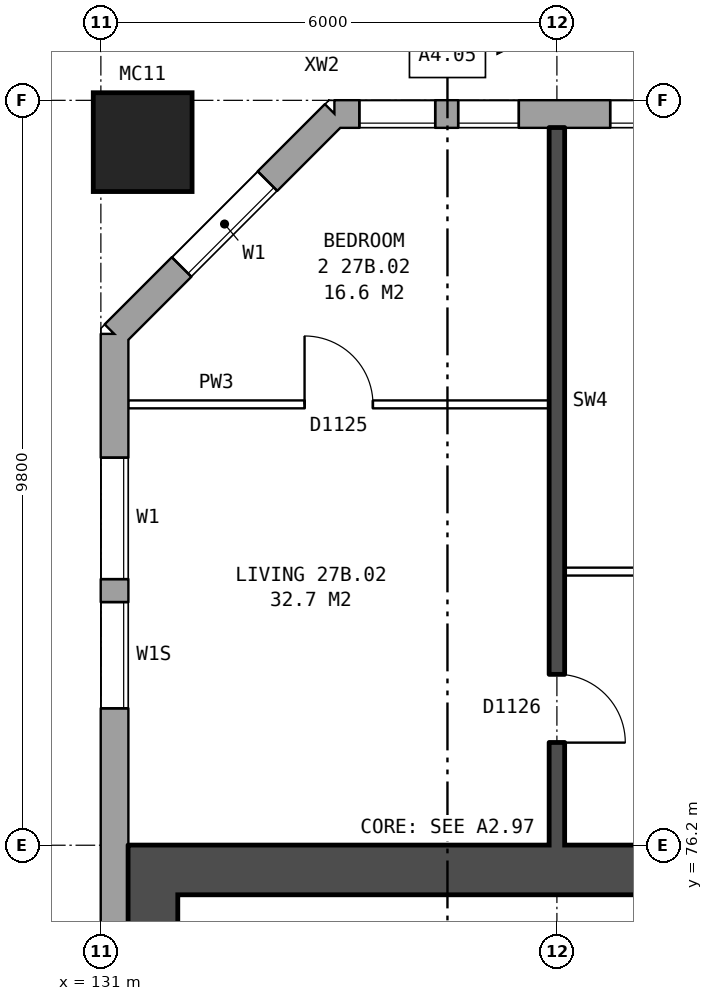
"""IFC4 building model, lengths in metres.
Left out: names, types, materials, properties, quantities, classifications, styles, units other than length and angle.
Written with IfcOpenShell. Run it as: python <this file> out.ifc"""

import sys

from ifc_helpers import new_model, si_unit, direction, frame, frame_2d, origin, origin_2d, place, context, subcontext, project, spatial, rectangle, hollow_rectangle, extrude, element, fill, save


model = new_model("IFC4")
c1 = context("Model", 3, precision=1e-05, world=origin(), true_north=direction((0.0, 1.0)))
c2 = subcontext(c1, "Body", "Model", "MODEL_VIEW")
j1 = project(units=[si_unit("LENGTHUNIT", "METRE"), si_unit("PLANEANGLEUNIT", "RADIAN")], contexts=[c1])
p1 = place(None, origin())
s1 = spatial("IfcSite", under=j1, at=p1, CompositionType="ELEMENT")
p2 = place(p1, origin())
s2 = spatial("IfcBuilding", under=s1, at=p2, CompositionType="ELEMENT")
p3 = place(p2, frame((0.0, 0.0, 99.5)))
s3 = spatial("IfcBuildingStorey", under=s2, at=p3, CompositionType="ELEMENT", Elevation=99.5)
p4 = place(p3, frame((131.55, 85.45, 0.0), z_axis=(0.0, 0.0, 1.0), x_axis=(1.0, 0.0, 0.0)))
e1 = element("IfcColumn", 1, at=p4, inside=s3, PredefinedType="COLUMN", context=c2, shape_type="SweptSolid", body=[
    extrude(hollow_rectangle(XDim=1.3, YDim=1.3, WallThickness=0.07, at=origin_2d()), origin(), (0.0, 0.0, 1.0), 3.1),
])
p5 = place(p3, frame((170.925, 85.82, 0.0), z_axis=(0.0, 0.0, 1.0), x_axis=(-1.0, 0.0, 0.0)))
e2 = element("IfcWall", 2, at=p5, inside=s3, PredefinedType="STANDARD", context=c2, shape_type="SweptSolid", body=[
    extrude(rectangle(XDim=36.851, YDim=0.36, at=frame_2d((18.425, 0.0))), origin(), (0.0, 0.0, 1.0), 2.85),
])
p6 = place(p5, frame((0.3, 0.0, 0.8)))
e3 = element("IfcOpeningElement", 3, at=p6, cuts=e2, PredefinedType="OPENING", context=c2, shape_type="SweptSolid", body=[
    extrude(rectangle(XDim=1.0, YDim=1.8, at=frame_2d((0.5, 0.9))), frame((0.0, 0.19, 0.0), z_axis=(0.0, -1.0, 0.0), x_axis=(1.0, 0.0, 0.0)), (0.0, 0.0, 1.0), 0.38),
])
p7 = place(p5, frame((4.625, 0.0, 0.8)))
e4 = element("IfcOpeningElement", 4, at=p7, cuts=e2, PredefinedType="OPENING", context=c2, shape_type="SweptSolid", body=[
    extrude(rectangle(XDim=1.6, YDim=1.8, at=frame_2d((0.8, 0.9))), frame((0.0, 0.19, 0.0), z_axis=(0.0, -1.0, 0.0), x_axis=(1.0, 0.0, 0.0)), (0.0, 0.0, 1.0), 0.38),
])
p8 = place(p5, frame((7.625, 0.0, 0.8)))
e5 = element("IfcOpeningElement", 5, at=p8, cuts=e2, PredefinedType="OPENING", context=c2, shape_type="SweptSolid", body=[
    extrude(rectangle(XDim=1.6, YDim=1.8, at=frame_2d((0.8, 0.9))), frame((0.0, 0.19, 0.0), z_axis=(0.0, -1.0, 0.0), x_axis=(1.0, 0.0, 0.0)), (0.0, 0.0, 1.0), 0.38),
])
p9 = place(p5, frame((10.625, 0.0, 0.8)))
e6 = element("IfcOpeningElement", 6, at=p9, cuts=e2, PredefinedType="OPENING", context=c2, shape_type="SweptSolid", body=[
    extrude(rectangle(XDim=1.6, YDim=1.8, at=frame_2d((0.8, 0.9))), frame((0.0, 0.19, 0.0), z_axis=(0.0, -1.0, 0.0), x_axis=(1.0, 0.0, 0.0)), (0.0, 0.0, 1.0), 0.38),
])
p10 = place(p5, frame((13.625, 0.0, 0.8)))
e7 = element("IfcOpeningElement", 7, at=p10, cuts=e2, PredefinedType="OPENING", context=c2, shape_type="SweptSolid", body=[
    extrude(rectangle(XDim=1.6, YDim=1.8, at=frame_2d((0.8, 0.9))), frame((0.0, 0.19, 0.0), z_axis=(0.0, -1.0, 0.0), x_axis=(1.0, 0.0, 0.0)), (0.0, 0.0, 1.0), 0.38),
])
p11 = place(p5, frame((16.625, 0.0, 0.8)))
e8 = element("IfcOpeningElement", 8, at=p11, cuts=e2, PredefinedType="OPENING", context=c2, shape_type="SweptSolid", body=[
    extrude(rectangle(XDim=1.6, YDim=1.8, at=frame_2d((0.8, 0.9))), frame((0.0, 0.19, 0.0), z_axis=(0.0, -1.0, 0.0), x_axis=(1.0, 0.0, 0.0)), (0.0, 0.0, 1.0), 0.38),
])
p12 = place(p5, frame((19.625, 0.0, 0.8)))
e9 = element("IfcOpeningElement", 9, at=p12, cuts=e2, PredefinedType="OPENING", context=c2, shape_type="SweptSolid", body=[
    extrude(rectangle(XDim=1.6, YDim=1.8, at=frame_2d((0.8, 0.9))), frame((0.0, 0.19, 0.0), z_axis=(0.0, -1.0, 0.0), x_axis=(1.0, 0.0, 0.0)), (0.0, 0.0, 1.0), 0.38),
])
p13 = place(p5, frame((22.625, 0.0, 0.8)))
e10 = element("IfcOpeningElement", 10, at=p13, cuts=e2, PredefinedType="OPENING", context=c2, shape_type="SweptSolid", body=[
    extrude(rectangle(XDim=1.6, YDim=1.8, at=frame_2d((0.8, 0.9))), frame((0.0, 0.19, 0.0), z_axis=(0.0, -1.0, 0.0), x_axis=(1.0, 0.0, 0.0)), (0.0, 0.0, 1.0), 0.38),
])
p14 = place(p5, frame((25.625, 0.0, 0.8)))
e11 = element("IfcOpeningElement", 11, at=p14, cuts=e2, PredefinedType="OPENING", context=c2, shape_type="SweptSolid", body=[
    extrude(rectangle(XDim=1.6, YDim=1.8, at=frame_2d((0.8, 0.9))), frame((0.0, 0.19, 0.0), z_axis=(0.0, -1.0, 0.0), x_axis=(1.0, 0.0, 0.0)), (0.0, 0.0, 1.0), 0.38),
])
p15 = place(p5, frame((28.625, 0.0, 0.8)))
e12 = element("IfcOpeningElement", 12, at=p15, cuts=e2, PredefinedType="OPENING", context=c2, shape_type="SweptSolid", body=[
    extrude(rectangle(XDim=1.6, YDim=1.8, at=frame_2d((0.8, 0.9))), frame((0.0, 0.19, 0.0), z_axis=(0.0, -1.0, 0.0), x_axis=(1.0, 0.0, 0.0)), (0.0, 0.0, 1.0), 0.38),
])
p16 = place(p5, frame((30.525, 0.0, 0.8)))
e13 = element("IfcOpeningElement", 13, at=p16, cuts=e2, PredefinedType="OPENING", context=c2, shape_type="SweptSolid", body=[
    extrude(rectangle(XDim=1.6, YDim=1.8, at=frame_2d((0.8, 0.9))), frame((0.0, 0.19, 0.0), z_axis=(0.0, -1.0, 0.0), x_axis=(1.0, 0.0, 0.0)), (0.0, 0.0, 1.0), 0.38),
])
p17 = place(p5, frame((34.425, 0.0, 1.7)))
e14 = element("IfcOpeningElement", 14, at=p17, cuts=e2, PredefinedType="OPENING", context=c2, shape_type="SweptSolid", body=[
    extrude(rectangle(XDim=0.8, YDim=0.9, at=frame_2d((0.4, 0.45))), frame((0.0, 0.19, 0.0), z_axis=(0.0, -1.0, 0.0), x_axis=(1.0, 0.0, 0.0)), (0.0, 0.0, 1.0), 0.38),
])
p18 = place(p5, frame((1.6, 0.0, 1.7)))
e15 = element("IfcOpeningElement", 15, at=p18, cuts=e2, PredefinedType="OPENING", context=c2, shape_type="SweptSolid", body=[
    extrude(rectangle(XDim=0.8, YDim=0.9, at=frame_2d((0.4, 0.45))), frame((0.0, 0.19, 0.0), z_axis=(0.0, -1.0, 0.0), x_axis=(1.0, 0.0, 0.0)), (0.0, 0.0, 1.0), 0.38),
])
p19 = place(p5, frame((32.425, 0.0, 0.8)))
e16 = element("IfcOpeningElement", 16, at=p19, cuts=e2, PredefinedType="OPENING", context=c2, shape_type="SweptSolid", body=[
    extrude(rectangle(XDim=0.8, YDim=0.9, at=frame_2d((0.4, 0.45))), frame((0.0, 0.19, 0.0), z_axis=(0.0, -1.0, 0.0), x_axis=(1.0, 0.0, 0.0)), (0.0, 0.0, 1.0), 0.38),
])
p20 = place(p5, frame((35.525, 0.0, 0.8)))
e17 = element("IfcOpeningElement", 17, at=p20, cuts=e2, PredefinedType="OPENING", context=c2, shape_type="SweptSolid", body=[
    extrude(rectangle(XDim=1.0, YDim=1.8, at=frame_2d((0.5, 0.9))), frame((0.0, 0.19, 0.0), z_axis=(0.0, -1.0, 0.0), x_axis=(1.0, 0.0, 0.0)), (0.0, 0.0, 1.0), 0.38),
])
p21 = place(p3, frame((134.075, 85.82, 0.0), z_axis=(0.0, 0.0, 1.0), x_axis=(-0.707106781187, -0.707106781187, 0.0)))
e18 = element("IfcWall", 18, at=p21, inside=s3, PredefinedType="STANDARD", context=c2, shape_type="SweptSolid", body=[
    extrude(rectangle(XDim=4.094, YDim=0.36, at=frame_2d((2.047, 0.0))), origin(), (0.0, 0.0, 1.0), 2.85),
])
p22 = place(p21, frame((1.247, 0.0, 0.8)))
e19 = element("IfcOpeningElement", 19, at=p22, cuts=e18, PredefinedType="OPENING", context=c2, shape_type="SweptSolid", body=[
    extrude(rectangle(XDim=1.6, YDim=1.8, at=frame_2d((0.8, 0.9))), frame((0.0, 0.19, 0.0), z_axis=(0.0, -1.0, 0.0), x_axis=(1.0, 0.0, 0.0)), (0.0, 0.0, 1.0), 0.38),
])
p23 = place(p3, frame((131.18, 82.925, 0.0), z_axis=(0.0, 0.0, 1.0), x_axis=(0.0, -1.0, 0.0)))
e20 = element("IfcWall", 20, at=p23, inside=s3, PredefinedType="STANDARD", context=c2, shape_type="SweptSolid", body=[
    extrude(rectangle(XDim=25.851, YDim=0.36, at=frame_2d((12.925, 0.0))), origin(), (0.0, 0.0, 1.0), 2.85),
])
p24 = place(p23, frame((1.625, 0.0, 0.8)))
e21 = element("IfcOpeningElement", 21, at=p24, cuts=e20, PredefinedType="OPENING", context=c2, shape_type="SweptSolid", body=[
    extrude(rectangle(XDim=1.6, YDim=1.8, at=frame_2d((0.8, 0.9))), frame((0.0, 0.19, 0.0), z_axis=(0.0, -1.0, 0.0), x_axis=(1.0, 0.0, 0.0)), (0.0, 0.0, 1.0), 0.38),
])
p25 = place(p23, frame((3.525, 0.0, 1.7)))
e22 = element("IfcOpeningElement", 22, at=p25, cuts=e20, PredefinedType="OPENING", context=c2, shape_type="SweptSolid", body=[
    extrude(rectangle(XDim=1.4, YDim=0.9, at=frame_2d((0.7, 0.45))), frame((0.0, 0.19, 0.0), z_axis=(0.0, -1.0, 0.0), x_axis=(1.0, 0.0, 0.0)), (0.0, 0.0, 1.0), 0.38),
])
p26 = place(p23, frame((20.775, 0.0, 1.7)))
e23 = element("IfcOpeningElement", 23, at=p26, cuts=e20, PredefinedType="OPENING", context=c2, shape_type="SweptSolid", body=[
    extrude(rectangle(XDim=1.4, YDim=0.9, at=frame_2d((0.7, 0.45))), frame((0.0, 0.19, 0.0), z_axis=(0.0, -1.0, 0.0), x_axis=(1.0, 0.0, 0.0)), (0.0, 0.0, 1.0), 0.38),
])
p27 = place(p23, frame((22.625, 0.0, 0.8)))
e24 = element("IfcOpeningElement", 24, at=p27, cuts=e20, PredefinedType="OPENING", context=c2, shape_type="SweptSolid", body=[
    extrude(rectangle(XDim=1.6, YDim=1.8, at=frame_2d((0.8, 0.9))), frame((0.0, 0.19, 0.0), z_axis=(0.0, -1.0, 0.0), x_axis=(1.0, 0.0, 0.0)), (0.0, 0.0, 1.0), 0.38),
])
p28 = place(p3, frame((131.685, 64.45, 0.0), z_axis=(0.0, 0.0, 1.0), x_axis=(0.0, 1.0, 0.0)))
e25 = element("IfcWall", 25, at=p28, inside=s3, PredefinedType="SHEAR", context=c2, shape_type="SweptSolid", body=[
    extrude(rectangle(XDim=11.1, YDim=0.65, at=frame_2d((5.55, 0.0))), origin(), (0.0, 0.0, 1.0), 2.85),
])
p29 = place(p3, frame((139.76, 75.875, 0.0), z_axis=(0.0, 0.0, 1.0), x_axis=(-1.0, 0.0, 0.0)))
e26 = element("IfcWall", 26, at=p29, inside=s3, PredefinedType="SHEAR", context=c2, shape_type="SweptSolid", body=[
    extrude(rectangle(XDim=8.4, YDim=0.65, at=frame_2d((4.2, 0.0))), origin(), (0.0, 0.0, 1.0), 2.85),
])
p30 = place(p3, frame((137.1, 79.8, 0.0), z_axis=(0.0, 0.0, 1.0), x_axis=(1.0, 0.0, 0.0)))
e27 = element("IfcWall", 27, at=p30, inside=s3, PredefinedType="PARTITIONING", context=c2, shape_type="SweptSolid", body=[
    extrude(rectangle(XDim=5.8, YDim=0.1, at=frame_2d((2.9, 0.0))), origin(), (0.0, 0.0, 1.0), 2.85),
])
p31 = place(p30, frame((1.3, 0.0, 0.0)))
e28 = element("IfcOpeningElement", 28, at=p31, cuts=e27, PredefinedType="OPENING", context=c2, shape_type="SweptSolid", body=[
    extrude(rectangle(XDim=0.9, YDim=2.1, at=frame_2d((0.45, 1.05))), frame((0.0, 0.06, 0.0), z_axis=(0.0, -1.0, 0.0), x_axis=(1.0, 0.0, 0.0)), (0.0, 0.0, 1.0), 0.12),
])
p32 = place(p30, frame((4.2, 0.0, 0.0)))
e29 = element("IfcOpeningElement", 29, at=p32, cuts=e27, PredefinedType="OPENING", context=c2, shape_type="SweptSolid", body=[
    extrude(rectangle(XDim=0.9, YDim=2.1, at=frame_2d((0.45, 1.05))), frame((0.0, 0.06, 0.0), z_axis=(0.0, -1.0, 0.0), x_axis=(1.0, 0.0, 0.0)), (0.0, 0.0, 1.0), 0.12),
])
p33 = place(p3, frame((131.36, 82.0, 0.0), z_axis=(0.0, 0.0, 1.0), x_axis=(1.0, 0.0, 0.0)))
e30 = element("IfcWall", 30, at=p33, inside=s3, PredefinedType="PARTITIONING", context=c2, shape_type="SweptSolid", body=[
    extrude(rectangle(XDim=5.54, YDim=0.1, at=frame_2d((2.77, 0.0))), origin(), (0.0, 0.0, 1.0), 2.85),
])
p34 = place(p33, frame((2.32, 0.0, 0.0)))
e31 = element("IfcOpeningElement", 31, at=p34, cuts=e30, PredefinedType="OPENING", context=c2, shape_type="SweptSolid", body=[
    extrude(rectangle(XDim=0.9, YDim=2.1, at=frame_2d((0.45, 1.05))), frame((0.0, 0.06, 0.0), z_axis=(0.0, -1.0, 0.0), x_axis=(1.0, 0.0, 0.0)), (0.0, 0.0, 1.0), 0.12),
])
p35 = place(p3, frame((137.0, 76.2, 0.0), z_axis=(0.0, 0.0, 1.0), x_axis=(0.0, 1.0, 0.0)))
e32 = element("IfcWall", 32, at=p35, inside=s3, PredefinedType="SOLIDWALL", context=c2, shape_type="SweptSolid", body=[
    extrude(rectangle(XDim=9.44, YDim=0.2, at=frame_2d((4.72, 0.0))), origin(), (0.0, 0.0, 1.0), 2.85),
])
p36 = place(p35, frame((1.35, 0.0, 0.0)))
e33 = element("IfcOpeningElement", 33, at=p36, cuts=e32, PredefinedType="OPENING", context=c2, shape_type="SweptSolid", body=[
    extrude(rectangle(XDim=0.9, YDim=2.1, at=frame_2d((0.45, 1.05))), frame((0.0, 0.11, 0.0), z_axis=(0.0, -1.0, 0.0), x_axis=(1.0, 0.0, 0.0)), (0.0, 0.0, 1.0), 0.22),
])
p37 = place(p17, origin())
e34 = element("IfcWindow", 34, at=p37, inside=s3, PartitioningType="SINGLE_PANEL", PredefinedType="WINDOW", context=c2, shape_type="SweptSolid", body=[
    extrude(rectangle(XDim=0.8, YDim=0.9, at=frame_2d((0.4, 0.45))), frame((0.0, 0.15, 0.0), z_axis=(0.0, -1.0, 0.0), x_axis=(1.0, 0.0, 0.0)), (0.0, 0.0, 1.0), 0.06),
])
fill(e14, e34)
p38 = place(p22, origin())
e35 = element("IfcWindow", 35, at=p38, inside=s3, PartitioningType="SINGLE_PANEL", PredefinedType="WINDOW", context=c2, shape_type="SweptSolid", body=[
    extrude(rectangle(XDim=1.6, YDim=1.8, at=frame_2d((0.8, 0.9))), frame((0.0, 0.15, 0.0), z_axis=(0.0, -1.0, 0.0), x_axis=(1.0, 0.0, 0.0)), (0.0, 0.0, 1.0), 0.06),
])
fill(e19, e35)
p39 = place(p24, origin())
e36 = element("IfcWindow", 36, at=p39, inside=s3, PartitioningType="SINGLE_PANEL", PredefinedType="WINDOW", context=c2, shape_type="SweptSolid", body=[
    extrude(rectangle(XDim=1.6, YDim=1.8, at=frame_2d((0.8, 0.9))), frame((0.0, 0.15, 0.0), z_axis=(0.0, -1.0, 0.0), x_axis=(1.0, 0.0, 0.0)), (0.0, 0.0, 1.0), 0.06),
])
fill(e21, e36)
p40 = place(p25, origin())
e37 = element("IfcWindow", 37, at=p40, inside=s3, PartitioningType="SINGLE_PANEL", PredefinedType="WINDOW", context=c2, shape_type="SweptSolid", body=[
    extrude(rectangle(XDim=1.4, YDim=0.9, at=frame_2d((0.7, 0.45))), frame((0.0, 0.15, 0.0), z_axis=(0.0, -1.0, 0.0), x_axis=(1.0, 0.0, 0.0)), (0.0, 0.0, 1.0), 0.06),
])
fill(e22, e37)
p41 = place(p34, origin())
e38 = element("IfcDoor", 38, at=p41, inside=s3, OperationType="SINGLE_SWING_LEFT", PredefinedType="DOOR", context=c2, shape_type="SweptSolid", body=[
    extrude(rectangle(XDim=0.9, YDim=2.1, at=frame_2d((0.45, 1.05))), frame((0.0, 0.025, 0.0), z_axis=(0.0, -1.0, 0.0), x_axis=(1.0, 0.0, 0.0)), (0.0, 0.0, 1.0), 0.05),
])
fill(e31, e38)
p42 = place(p36, frame((0.9, 0.0, 0.0), z_axis=(0.0, 0.0, 1.0), x_axis=(-1.0, 0.0, 0.0)))
e39 = element("IfcDoor", 39, at=p42, inside=s3, OperationType="SINGLE_SWING_RIGHT", PredefinedType="DOOR", context=c2, shape_type="SweptSolid", body=[
    extrude(rectangle(XDim=0.9, YDim=2.1, at=frame_2d((0.45, 1.05))), frame((0.0, 0.025, 0.0), z_axis=(0.0, -1.0, 0.0), x_axis=(1.0, 0.0, 0.0)), (0.0, 0.0, 1.0), 0.05),
])
fill(e33, e39)
p43 = place(p19, origin())
e40 = element("IfcWindow", 40, at=p43, inside=s3, PartitioningType="SINGLE_PANEL", PredefinedType="WINDOW", context=c2, shape_type="SweptSolid", body=[
    extrude(rectangle(XDim=0.8, YDim=0.9, at=frame_2d((0.4, 0.45))), frame((0.0, 0.15, 0.0), z_axis=(0.0, -1.0, 0.0), x_axis=(1.0, 0.0, 0.0)), (0.0, 0.0, 1.0), 0.06),
])
fill(e16, e40)
p44 = place(p20, origin())
e41 = element("IfcWindow", 41, at=p44, inside=s3, PartitioningType="SINGLE_PANEL", PredefinedType="WINDOW", context=c2, shape_type="SweptSolid", body=[
    extrude(rectangle(XDim=1.0, YDim=1.8, at=frame_2d((0.5, 0.9))), frame((0.0, 0.15, 0.0), z_axis=(0.0, -1.0, 0.0), x_axis=(1.0, 0.0, 0.0)), (0.0, 0.0, 1.0), 0.06),
])
fill(e17, e41)
save(model, sys.argv[1])
